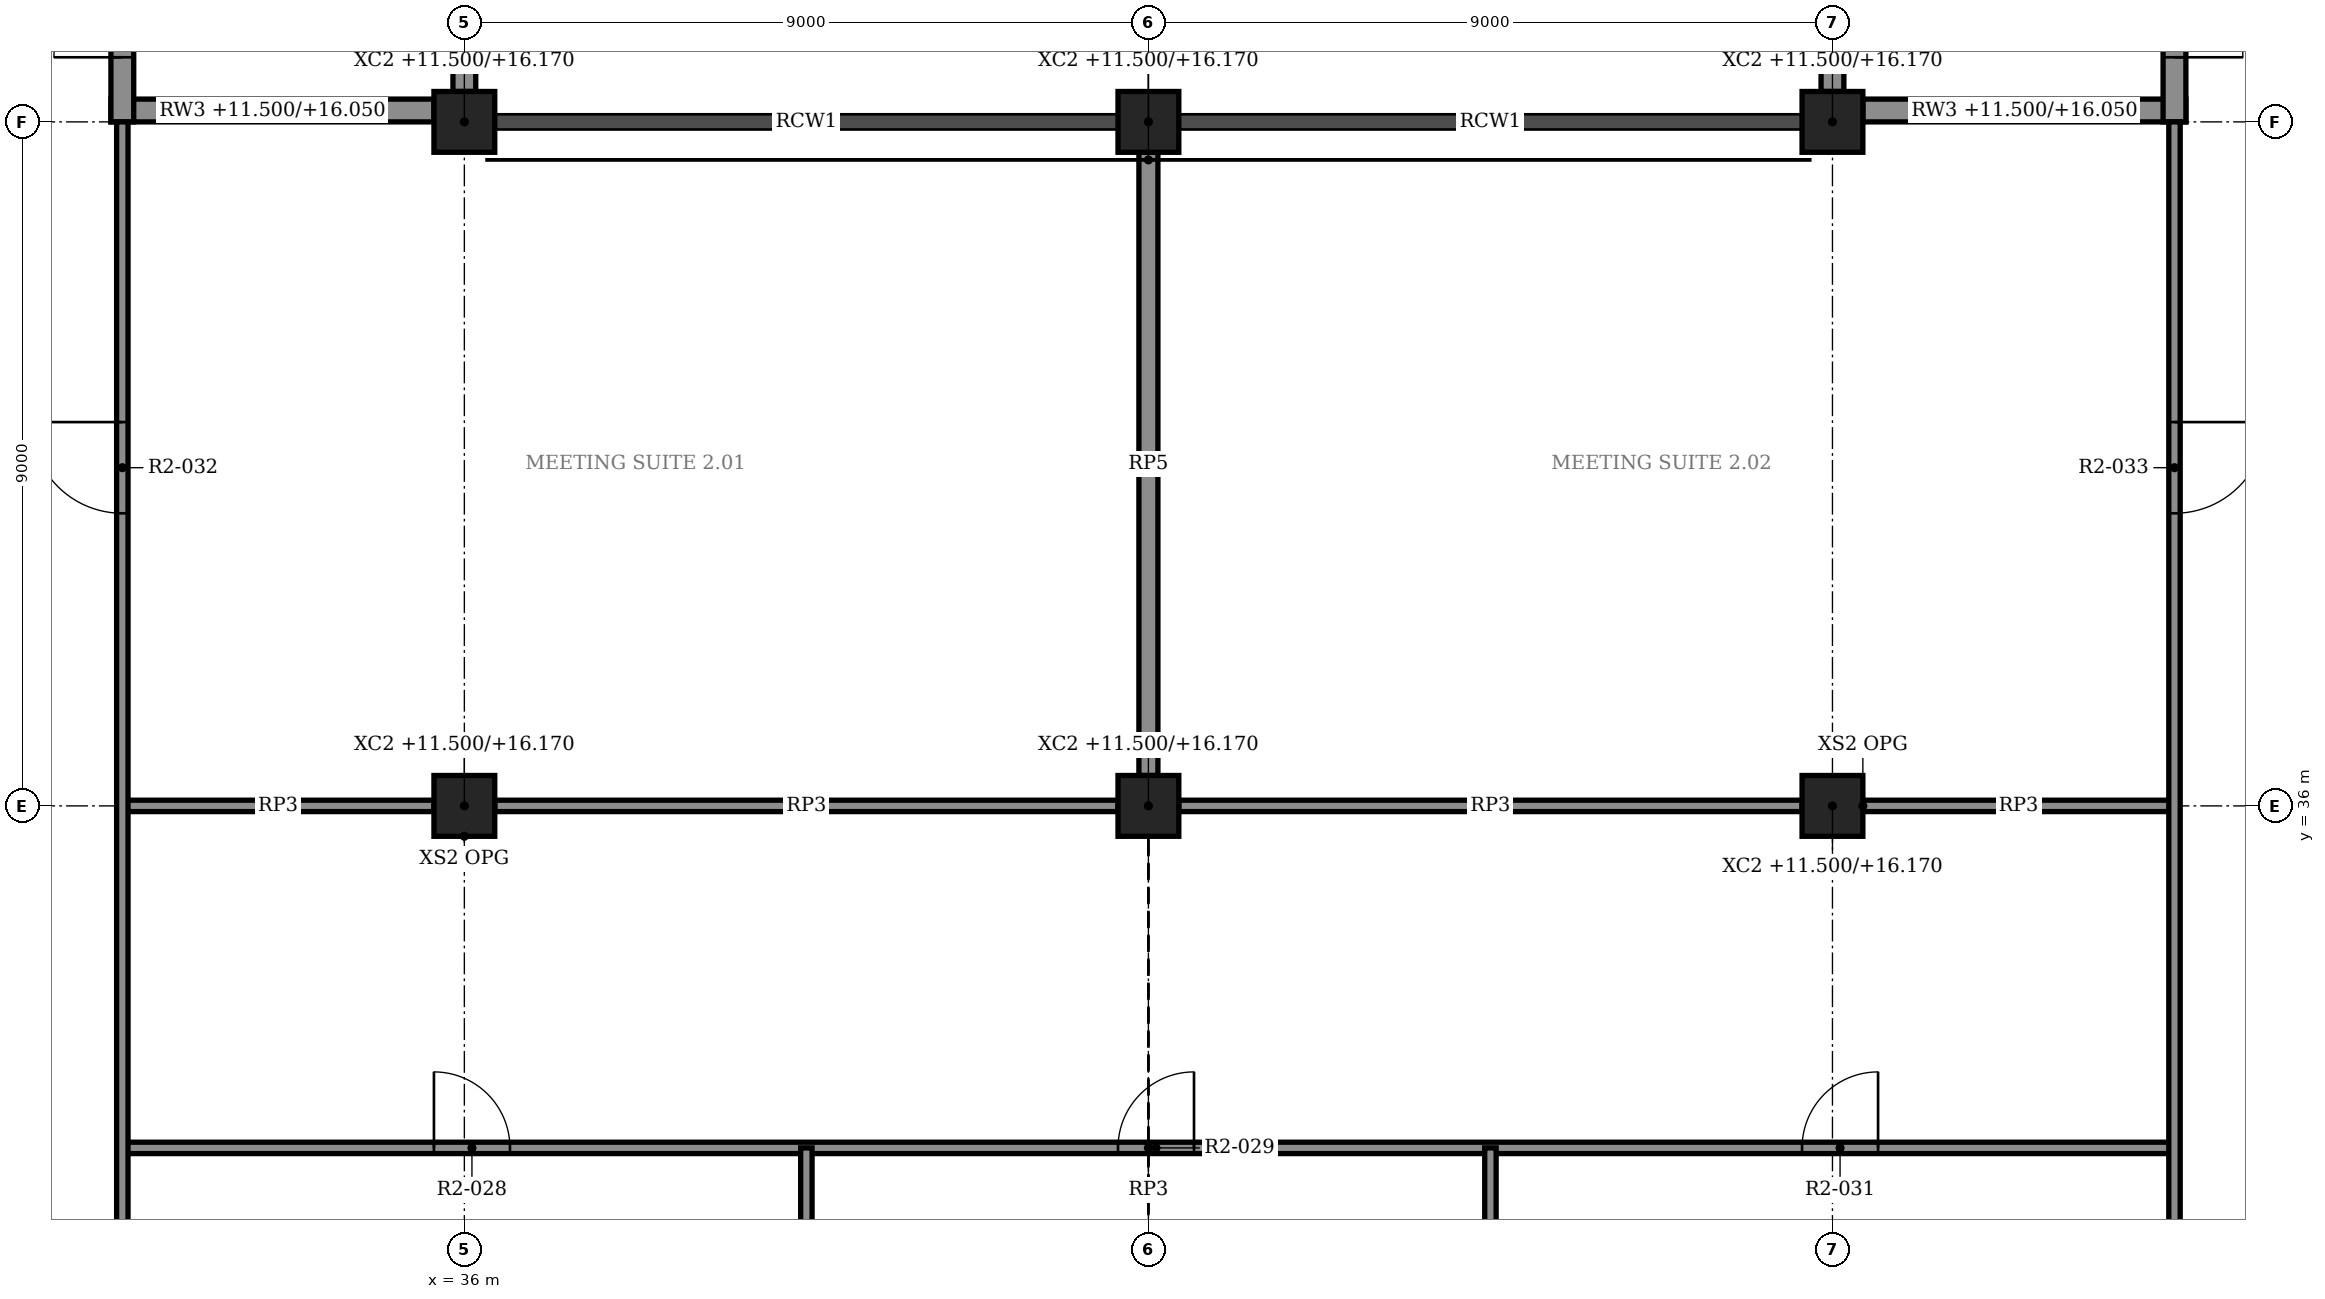
"""IFC4 building model, lengths in metres.
Left out: names, types, materials, properties, quantities, classifications, styles, units other than length and angle.
Written with IfcOpenShell. Run it as: python <this file> out.ifc"""

import sys

from ifc_helpers import new_model, si_unit, direction, frame, frame_2d, origin, origin_2d, place, context, subcontext, project, spatial, rectangle, extrude, element, fill, save


model = new_model("IFC4")
c1 = context("Model", 3, precision=1e-05, world=origin(), true_north=direction((0.0, 1.0)))
c2 = subcontext(c1, "Body", "Model", "MODEL_VIEW")
j1 = project(units=[si_unit("LENGTHUNIT", "METRE"), si_unit("PLANEANGLEUNIT", "RADIAN")], contexts=[c1])
p1 = place(None, origin())
s1 = spatial("IfcSite", under=j1, at=p1, CompositionType="ELEMENT")
p2 = place(p1, origin())
s2 = spatial("IfcBuilding", under=s1, at=p2, CompositionType="ELEMENT")
p3 = place(p2, frame((0.0, 0.0, 11.5)))
s3 = spatial("IfcBuildingStorey", under=s2, at=p3, CompositionType="ELEMENT", Elevation=11.5)
for number, where, z_axis, x_axis in (
    (1, (36.0, 36.0, 0.0), (0.0, 0.0, 1.0), (1.0, 0.0, 0.0)),
    (2, (36.0, 45.0, 0.0), (0.0, 0.0, 1.0), (1.0, 0.0, 0.0)),
    (3, (45.0, 36.0, 0.0), (0.0, 0.0, 1.0), (1.0, 0.0, 0.0)),
    (4, (45.0, 45.0, 0.0), (0.0, 0.0, 1.0), (1.0, 0.0, 0.0)),
    (5, (54.0, 36.0, 0.0), (0.0, 0.0, 1.0), (1.0, 0.0, 0.0)),
    (6, (54.0, 45.0, 0.0), (0.0, 0.0, 1.0), (1.0, 0.0, 0.0)),
):
    element("IfcColumn", number, at=place(p3, frame(where, z_axis=z_axis, x_axis=x_axis)), inside=s3, PredefinedType="COLUMN", context=c2, shape_type="SweptSolid", body=[
        extrude(rectangle(XDim=0.8, YDim=0.8, at=origin_2d()), origin(), (0.0, 0.0, 1.0), 4.67),
    ])
p4 = place(p3, frame((58.5, 45.0, 0.0), z_axis=(0.0, 0.0, 1.0), x_axis=(0.0, 1.0, 0.0)))
e7 = element("IfcWall", 7, at=p4, inside=s3, PredefinedType="SOLIDWALL", context=c2, shape_type="SweptSolid", body=[
    extrude(rectangle(XDim=18.0, YDim=0.3, at=frame_2d((9.0, 0.0))), origin(), (0.0, 0.0, 1.0), 4.55),
])
p5 = place(p4, frame((0.85, 0.0, 0.0)))
e8 = element("IfcOpeningElement", 8, at=p5, cuts=e7, PredefinedType="OPENING", context=c2, shape_type="SweptSolid", body=[
    extrude(rectangle(XDim=1.8, YDim=2.4, at=frame_2d((0.9, 1.2))), frame((0.0, 0.16, 0.0), z_axis=(0.0, -1.0, 0.0), x_axis=(1.0, 0.0, 0.0)), (0.0, 0.0, 1.0), 0.32),
])
p6 = place(p4, frame((15.25, 0.0, 0.0)))
e9 = element("IfcOpeningElement", 9, at=p6, cuts=e7, PredefinedType="OPENING", context=c2, shape_type="SweptSolid", body=[
    extrude(rectangle(XDim=1.8, YDim=2.4, at=frame_2d((0.9, 1.2))), frame((0.0, 0.16, 0.0), z_axis=(0.0, -1.0, 0.0), x_axis=(1.0, 0.0, 0.0)), (0.0, 0.0, 1.0), 0.32),
])
p7 = place(p3, frame((54.0, 45.4, 0.0), z_axis=(0.0, 0.0, 1.0), x_axis=(0.0, 1.0, 0.0)))
e10 = element("IfcWall", 10, at=p7, inside=s3, PredefinedType="SOLIDWALL", context=c2, shape_type="SweptSolid", body=[
    extrude(rectangle(XDim=8.2, YDim=0.3, at=frame_2d((4.1, 0.0))), origin(), (0.0, 0.0, 1.0), 4.55),
])
p8 = place(p3, frame((54.4, 45.15, 0.0), z_axis=(0.0, 0.0, 1.0), x_axis=(1.0, 0.0, 0.0)))
e11 = element("IfcWall", 11, at=p8, inside=s3, PredefinedType="SOLIDWALL", context=c2, shape_type="SweptSolid", body=[
    extrude(rectangle(XDim=4.25, YDim=0.3, at=frame_2d((2.125, 0.0))), origin(), (0.0, 0.0, 1.0), 4.55),
])
p9 = place(p3, frame((31.5, 45.0, 0.0), z_axis=(0.0, 0.0, 1.0), x_axis=(0.0, 1.0, 0.0)))
e12 = element("IfcWall", 12, at=p9, inside=s3, PredefinedType="SOLIDWALL", context=c2, shape_type="SweptSolid", body=[
    extrude(rectangle(XDim=18.0, YDim=0.3, at=frame_2d((9.0, 0.0))), origin(), (0.0, 0.0, 1.0), 4.55),
])
p10 = place(p9, frame((0.85, 0.0, 0.0)))
e13 = element("IfcOpeningElement", 13, at=p10, cuts=e12, PredefinedType="OPENING", context=c2, shape_type="SweptSolid", body=[
    extrude(rectangle(XDim=1.8, YDim=2.4, at=frame_2d((0.9, 1.2))), frame((0.0, 0.16, 0.0), z_axis=(0.0, -1.0, 0.0), x_axis=(1.0, 0.0, 0.0)), (0.0, 0.0, 1.0), 0.32),
])
p11 = place(p9, frame((15.25, 0.0, 0.0)))
e14 = element("IfcOpeningElement", 14, at=p11, cuts=e12, PredefinedType="OPENING", context=c2, shape_type="SweptSolid", body=[
    extrude(rectangle(XDim=1.8, YDim=2.4, at=frame_2d((0.9, 1.2))), frame((0.0, 0.16, 0.0), z_axis=(0.0, -1.0, 0.0), x_axis=(1.0, 0.0, 0.0)), (0.0, 0.0, 1.0), 0.32),
])
p12 = place(p3, frame((36.0, 45.4, 0.0), z_axis=(0.0, 0.0, 1.0), x_axis=(0.0, 1.0, 0.0)))
e15 = element("IfcWall", 15, at=p12, inside=s3, PredefinedType="SOLIDWALL", context=c2, shape_type="SweptSolid", body=[
    extrude(rectangle(XDim=8.2, YDim=0.3, at=frame_2d((4.1, 0.0))), origin(), (0.0, 0.0, 1.0), 4.55),
])
p13 = place(p3, frame((31.35, 45.15, 0.0), z_axis=(0.0, 0.0, 1.0), x_axis=(1.0, 0.0, 0.0)))
e16 = element("IfcWall", 16, at=p13, inside=s3, PredefinedType="SOLIDWALL", context=c2, shape_type="SweptSolid", body=[
    extrude(rectangle(XDim=4.25, YDim=0.3, at=frame_2d((2.125, 0.0))), origin(), (0.0, 0.0, 1.0), 4.55),
])
p14 = place(p3, frame((31.5, 31.5, 0.0), z_axis=(0.0, 0.0, 1.0), x_axis=(1.0, 0.0, 0.0)))
e17 = element("IfcWall", 17, at=p14, inside=s3, PredefinedType="PARTITIONING", context=c2, shape_type="SweptSolid", body=[
    extrude(rectangle(XDim=27.0, YDim=0.15, at=frame_2d((13.5, 0.0))), origin(), (0.0, 0.0, 1.0), 4.55),
])
p15 = place(p14, frame((4.1, 0.0, 0.0)))
e18 = element("IfcOpeningElement", 18, at=p15, cuts=e17, PredefinedType="OPENING", context=c2, shape_type="SweptSolid", body=[
    extrude(rectangle(XDim=1.0, YDim=2.4, at=frame_2d((0.5, 1.2))), frame((0.0, 0.085, 0.0), z_axis=(0.0, -1.0, 0.0), x_axis=(1.0, 0.0, 0.0)), (0.0, 0.0, 1.0), 0.17),
])
p16 = place(p14, frame((13.1, 0.0, 0.0)))
e19 = element("IfcOpeningElement", 19, at=p16, cuts=e17, PredefinedType="OPENING", context=c2, shape_type="SweptSolid", body=[
    extrude(rectangle(XDim=1.0, YDim=2.4, at=frame_2d((0.5, 1.2))), frame((0.0, 0.085, 0.0), z_axis=(0.0, -1.0, 0.0), x_axis=(1.0, 0.0, 0.0)), (0.0, 0.0, 1.0), 0.17),
])
p17 = place(p14, frame((22.1, 0.0, 0.0)))
e20 = element("IfcOpeningElement", 20, at=p17, cuts=e17, PredefinedType="OPENING", context=c2, shape_type="SweptSolid", body=[
    extrude(rectangle(XDim=1.0, YDim=2.4, at=frame_2d((0.5, 1.2))), frame((0.0, 0.085, 0.0), z_axis=(0.0, -1.0, 0.0), x_axis=(1.0, 0.0, 0.0)), (0.0, 0.0, 1.0), 0.17),
])
p18 = place(p3, frame((31.5, 36.0, 0.0), z_axis=(0.0, 0.0, 1.0), x_axis=(1.0, 0.0, 0.0)))
e21 = element("IfcWall", 21, at=p18, inside=s3, PredefinedType="PARTITIONING", context=c2, shape_type="SweptSolid", body=[
    extrude(rectangle(XDim=4.1, YDim=0.15, at=frame_2d((2.05, 0.0))), origin(), (0.0, 0.0, 1.0), 4.55),
])
for number, where, z_axis, x_axis in (
    (22, (36.4, 36.0, 0.0), (0.0, 0.0, 1.0), (1.0, 0.0, 0.0)),
    (23, (45.4, 36.0, 0.0), (0.0, 0.0, 1.0), (1.0, 0.0, 0.0)),
):
    element("IfcWall", number, at=place(p3, frame(where, z_axis=z_axis, x_axis=x_axis)), inside=s3, PredefinedType="PARTITIONING", context=c2, shape_type="SweptSolid", body=[
        extrude(rectangle(XDim=8.2, YDim=0.15, at=frame_2d((4.1, 0.0))), origin(), (0.0, 0.0, 1.0), 4.55),
    ])
p19 = place(p3, frame((54.4, 36.0, 0.0), z_axis=(0.0, 0.0, 1.0), x_axis=(1.0, 0.0, 0.0)))
e24 = element("IfcWall", 24, at=p19, inside=s3, PredefinedType="PARTITIONING", context=c2, shape_type="SweptSolid", body=[
    extrude(rectangle(XDim=4.1, YDim=0.15, at=frame_2d((2.05, 0.0))), origin(), (0.0, 0.0, 1.0), 4.55),
])
p20 = place(p3, frame((31.5, 9.0, 0.0), z_axis=(0.0, 0.0, 1.0), x_axis=(0.0, 1.0, 0.0)))
e25 = element("IfcWall", 25, at=p20, inside=s3, PredefinedType="PARTITIONING", context=c2, shape_type="SweptSolid", body=[
    extrude(rectangle(XDim=36.0, YDim=0.15, at=frame_2d((18.0, 0.0))), origin(), (0.0, 0.0, 1.0), 4.55),
])
p21 = place(p20, frame((10.85, 0.0, 0.0)))
e26 = element("IfcOpeningElement", 26, at=p21, cuts=e25, PredefinedType="OPENING", context=c2, shape_type="SweptSolid", body=[
    extrude(rectangle(XDim=1.0, YDim=2.4, at=frame_2d((0.5, 1.2))), frame((0.0, 0.085, 0.0), z_axis=(0.0, -1.0, 0.0), x_axis=(1.0, 0.0, 0.0)), (0.0, 0.0, 1.0), 0.17),
])
p22 = place(p20, frame((30.85, 0.0, 0.0)))
e27 = element("IfcOpeningElement", 27, at=p22, cuts=e25, PredefinedType="OPENING", context=c2, shape_type="SweptSolid", body=[
    extrude(rectangle(XDim=1.2, YDim=2.4, at=frame_2d((0.6, 1.2))), frame((0.0, 0.085, 0.0), z_axis=(0.0, -1.0, 0.0), x_axis=(1.0, 0.0, 0.0)), (0.0, 0.0, 1.0), 0.17),
])
p23 = place(p3, frame((40.5, 9.0, 0.0), z_axis=(0.0, 0.0, 1.0), x_axis=(0.0, 1.0, 0.0)))
e28 = element("IfcWall", 28, at=p23, inside=s3, PredefinedType="PARTITIONING", context=c2, shape_type="SweptSolid", body=[
    extrude(rectangle(XDim=22.5, YDim=0.15, at=frame_2d((11.25, 0.0))), origin(), (0.0, 0.0, 1.0), 4.55),
])
p24 = place(p3, frame((45.0, 36.4, 0.0), z_axis=(0.0, 0.0, 1.0), x_axis=(0.0, 1.0, 0.0)))
e29 = element("IfcWall", 29, at=p24, inside=s3, PredefinedType="PARTITIONING", context=c2, shape_type="SweptSolid", body=[
    extrude(rectangle(XDim=8.2, YDim=0.25, at=frame_2d((4.1, 0.0))), origin(), (0.0, 0.0, 1.0), 4.55),
])
p25 = place(p3, frame((49.5, 9.0, 0.0), z_axis=(0.0, 0.0, 1.0), x_axis=(0.0, 1.0, 0.0)))
e30 = element("IfcWall", 30, at=p25, inside=s3, PredefinedType="PARTITIONING", context=c2, shape_type="SweptSolid", body=[
    extrude(rectangle(XDim=22.5, YDim=0.15, at=frame_2d((11.25, 0.0))), origin(), (0.0, 0.0, 1.0), 4.55),
])
p26 = place(p3, frame((58.5, 9.0, 0.0), z_axis=(0.0, 0.0, 1.0), x_axis=(0.0, 1.0, 0.0)))
e31 = element("IfcWall", 31, at=p26, inside=s3, PredefinedType="PARTITIONING", context=c2, shape_type="SweptSolid", body=[
    extrude(rectangle(XDim=36.0, YDim=0.15, at=frame_2d((18.0, 0.0))), origin(), (0.0, 0.0, 1.0), 4.55),
])
p27 = place(p26, frame((10.85, 0.0, 0.0)))
e32 = element("IfcOpeningElement", 32, at=p27, cuts=e31, PredefinedType="OPENING", context=c2, shape_type="SweptSolid", body=[
    extrude(rectangle(XDim=1.0, YDim=2.4, at=frame_2d((0.5, 1.2))), frame((0.0, 0.085, 0.0), z_axis=(0.0, -1.0, 0.0), x_axis=(1.0, 0.0, 0.0)), (0.0, 0.0, 1.0), 0.17),
])
p28 = place(p26, frame((30.85, 0.0, 0.0)))
e33 = element("IfcOpeningElement", 33, at=p28, cuts=e31, PredefinedType="OPENING", context=c2, shape_type="SweptSolid", body=[
    extrude(rectangle(XDim=1.2, YDim=2.4, at=frame_2d((0.6, 1.2))), frame((0.0, 0.085, 0.0), z_axis=(0.0, -1.0, 0.0), x_axis=(1.0, 0.0, 0.0)), (0.0, 0.0, 1.0), 0.17),
])
p29 = place(p5, frame((1.8, 0.0, 0.0), z_axis=(0.0, 0.0, 1.0), x_axis=(-1.0, 0.0, 0.0)))
e34 = element("IfcDoor", 34, at=p29, inside=s3, OperationType="DOUBLE_DOOR_SINGLE_SWING", PredefinedType="DOOR", context=c2, shape_type="SweptSolid", body=[
    extrude(rectangle(XDim=1.8, YDim=2.4, at=frame_2d((0.9, 1.2))), frame((0.0, 0.025, 0.0), z_axis=(0.0, -1.0, 0.0), x_axis=(1.0, 0.0, 0.0)), (0.0, 0.0, 1.0), 0.05),
])
fill(e8, e34)
p30 = place(p10, origin())
e35 = element("IfcDoor", 35, at=p30, inside=s3, OperationType="DOUBLE_DOOR_SINGLE_SWING", PredefinedType="DOOR", context=c2, shape_type="SweptSolid", body=[
    extrude(rectangle(XDim=1.8, YDim=2.4, at=frame_2d((0.9, 1.2))), frame((0.0, 0.025, 0.0), z_axis=(0.0, -1.0, 0.0), x_axis=(1.0, 0.0, 0.0)), (0.0, 0.0, 1.0), 0.05),
])
fill(e13, e35)
p31 = place(p15, origin())
e36 = element("IfcDoor", 36, at=p31, inside=s3, OperationType="SINGLE_SWING_LEFT", PredefinedType="DOOR", context=c2, shape_type="SweptSolid", body=[
    extrude(rectangle(XDim=1.0, YDim=2.4, at=frame_2d((0.5, 1.2))), frame((0.0, 0.025, 0.0), z_axis=(0.0, -1.0, 0.0), x_axis=(1.0, 0.0, 0.0)), (0.0, 0.0, 1.0), 0.05),
])
fill(e18, e36)
p32 = place(p16, origin())
e37 = element("IfcDoor", 37, at=p32, inside=s3, OperationType="SINGLE_SWING_LEFT", PredefinedType="DOOR", context=c2, shape_type="SweptSolid", body=[
    extrude(rectangle(XDim=1.0, YDim=2.4, at=frame_2d((0.5, 1.2))), frame((0.0, 0.025, 0.0), z_axis=(0.0, -1.0, 0.0), x_axis=(1.0, 0.0, 0.0)), (0.0, 0.0, 1.0), 0.05),
])
fill(e19, e37)
p33 = place(p17, origin())
e38 = element("IfcDoor", 38, at=p33, inside=s3, OperationType="SINGLE_SWING_LEFT", PredefinedType="DOOR", context=c2, shape_type="SweptSolid", body=[
    extrude(rectangle(XDim=1.0, YDim=2.4, at=frame_2d((0.5, 1.2))), frame((0.0, 0.025, 0.0), z_axis=(0.0, -1.0, 0.0), x_axis=(1.0, 0.0, 0.0)), (0.0, 0.0, 1.0), 0.05),
])
fill(e20, e38)
p34 = place(p22, origin())
e39 = element("IfcDoor", 39, at=p34, inside=s3, OperationType="SINGLE_SWING_LEFT", PredefinedType="DOOR", context=c2, shape_type="SweptSolid", body=[
    extrude(rectangle(XDim=1.2, YDim=2.4, at=frame_2d((0.6, 1.2))), frame((0.0, 0.025, 0.0), z_axis=(0.0, -1.0, 0.0), x_axis=(1.0, 0.0, 0.0)), (0.0, 0.0, 1.0), 0.05),
])
fill(e27, e39)
p35 = place(p28, frame((1.2, 0.0, 0.0), z_axis=(0.0, 0.0, 1.0), x_axis=(-1.0, 0.0, 0.0)))
e40 = element("IfcDoor", 40, at=p35, inside=s3, OperationType="SINGLE_SWING_LEFT", PredefinedType="DOOR", context=c2, shape_type="SweptSolid", body=[
    extrude(rectangle(XDim=1.2, YDim=2.4, at=frame_2d((0.6, 1.2))), frame((0.0, 0.025, 0.0), z_axis=(0.0, -1.0, 0.0), x_axis=(1.0, 0.0, 0.0)), (0.0, 0.0, 1.0), 0.05),
])
fill(e33, e40)
save(model, sys.argv[1])
